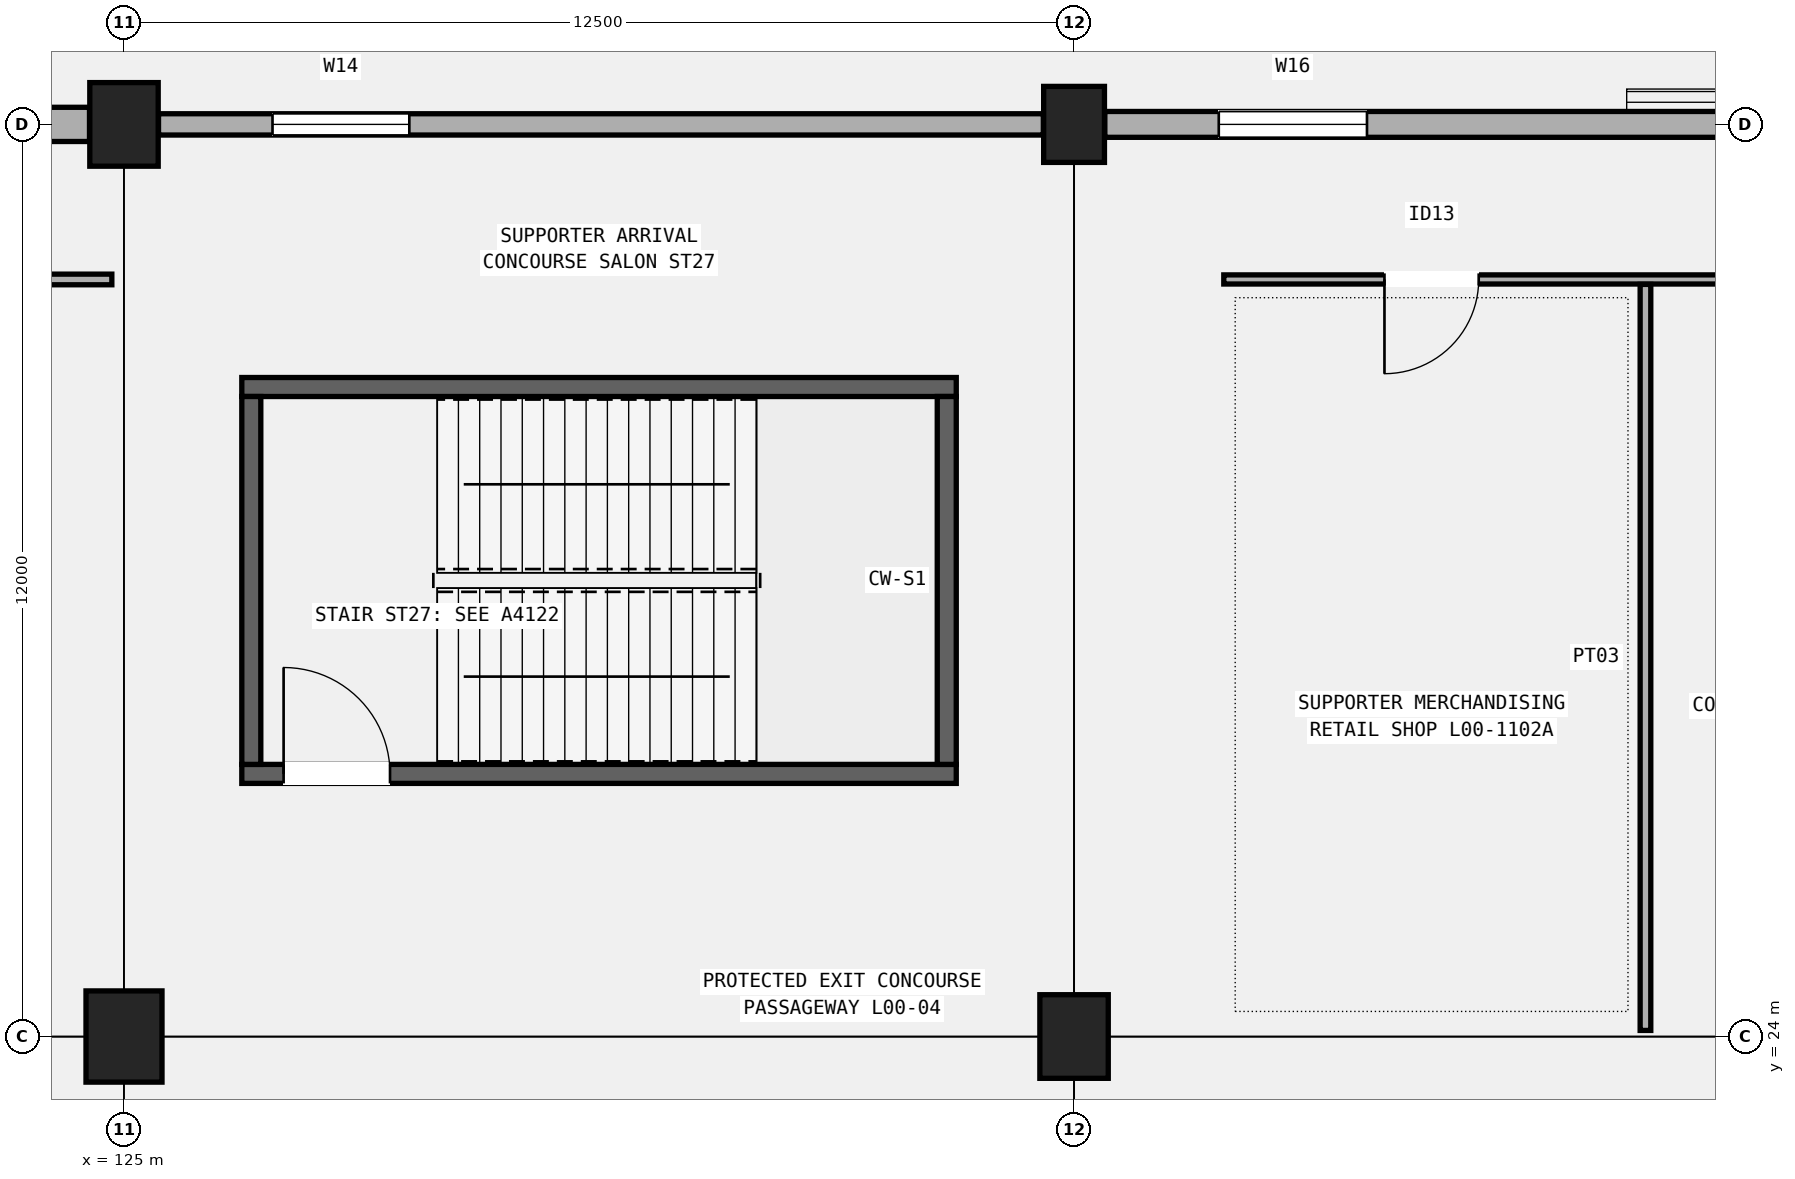
"""IFC4 building model, lengths in metres.
Left out: names, types, materials, properties, quantities, classifications, styles, units other than length and angle.
Written with IfcOpenShell. Run it as: python <this file> out.ifc"""

import sys

from ifc_helpers import new_model, si_unit, direction, frame, frame_2d, origin, origin_2d, place, context, subcontext, project, spatial, rectangle, extrude, element, fill, save


model = new_model("IFC4")
c1 = context("Model", 3, precision=1e-05, world=origin(), true_north=direction((0.0, 1.0)))
c2 = subcontext(c1, "Body", "Model", "MODEL_VIEW")
j1 = project(units=[si_unit("LENGTHUNIT", "METRE"), si_unit("PLANEANGLEUNIT", "RADIAN")], contexts=[c1])
p1 = place(None, origin())
s1 = spatial("IfcSite", under=j1, at=p1, CompositionType="ELEMENT")
p2 = place(p1, origin())
s2 = spatial("IfcBuilding", under=s1, at=p2, CompositionType="ELEMENT")
p3 = place(p2, origin())
s3 = spatial("IfcBuildingStorey", under=s2, at=p3, CompositionType="ELEMENT", Elevation=0.0)
p4 = place(p3, frame((125.0, 24.0, 0.0), z_axis=(0.0, 0.0, 1.0), x_axis=(1.0, 0.0, 0.0)))
e1 = element("IfcColumn", 1, at=p4, inside=s3, PredefinedType="COLUMN", context=c2, shape_type="SweptSolid", body=[
    extrude(rectangle(XDim=1.0, YDim=1.2, at=origin_2d()), origin(), (0.0, 0.0, 1.0), 5.4),
])
for number, where, z_axis, x_axis in (
    (2, (125.0, 36.0, 0.0), (0.0, 0.0, 1.0), (1.0, 0.0, 0.0)),
    (3, (137.5, 24.0, 0.0), (0.0, 0.0, 1.0), (1.0, 0.0, 0.0)),
):
    element("IfcColumn", number, at=place(p3, frame(where, z_axis=z_axis, x_axis=x_axis)), inside=s3, PredefinedType="COLUMN", context=c2, shape_type="SweptSolid", body=[
        extrude(rectangle(XDim=0.9, YDim=1.1, at=origin_2d()), origin(), (0.0, 0.0, 1.0), 5.4),
    ])
p5 = place(p3, frame((137.5, 36.0, 0.0), z_axis=(0.0, 0.0, 1.0), x_axis=(1.0, 0.0, 0.0)))
e4 = element("IfcColumn", 4, at=p5, inside=s3, PredefinedType="COLUMN", context=c2, shape_type="SweptSolid", body=[
    extrude(rectangle(XDim=0.8, YDim=1.0, at=origin_2d()), origin(), (0.0, 0.0, 1.0), 5.4),
])
p6 = place(p3, frame((112.504, 36.0, 0.0), z_axis=(0.0, 0.0, 1.0), x_axis=(1.0, 0.0, 0.0)))
e5 = element("IfcWall", 5, at=p6, inside=s3, PredefinedType="SOLIDWALL", context=c2, shape_type="SweptSolid", body=[
    extrude(rectangle(XDim=12.042, YDim=0.45, at=frame_2d((6.021, 0.0))), origin(), (0.0, 0.0, 1.0), 4.09),
])
p7 = place(p6, frame((1.5, 0.0, 0.95)))
e6 = element("IfcOpeningElement", 6, at=p7, cuts=e5, PredefinedType="OPENING", context=c2, shape_type="SweptSolid", body=[
    extrude(rectangle(XDim=1.65, YDim=2.45, at=frame_2d((0.825, 1.225))), frame((0.0, 0.235, 0.0), z_axis=(0.0, -1.0, 0.0), x_axis=(1.0, 0.0, 0.0)), (0.0, 0.0, 1.0), 0.47),
])
p8 = place(p3, frame((125.454, 36.0, 0.0), z_axis=(0.0, 0.0, 1.0), x_axis=(1.0, 0.0, 0.0)))
e7 = element("IfcWall", 7, at=p8, inside=s3, PredefinedType="SOLIDWALL", context=c2, shape_type="SweptSolid", body=[
    extrude(rectangle(XDim=11.642, YDim=0.28, at=frame_2d((5.821, 0.0))), origin(), (0.0, 0.0, 1.0), 4.24),
])
p9 = place(p8, frame((1.5, 0.0, 0.95)))
e8 = element("IfcOpeningElement", 8, at=p9, cuts=e7, PredefinedType="OPENING", context=c2, shape_type="SweptSolid", body=[
    extrude(rectangle(XDim=1.8, YDim=2.15, at=frame_2d((0.9, 1.075))), frame((0.0, 0.15, 0.0), z_axis=(0.0, -1.0, 0.0), x_axis=(1.0, 0.0, 0.0)), (0.0, 0.0, 1.0), 0.3),
])
p10 = place(p3, frame((137.904, 36.0, 0.0), z_axis=(0.0, 0.0, 1.0), x_axis=(1.0, 0.0, 0.0)))
e9 = element("IfcWall", 9, at=p10, inside=s3, PredefinedType="SOLIDWALL", context=c2, shape_type="SweptSolid", body=[
    extrude(rectangle(XDim=11.667, YDim=0.34, at=frame_2d((5.833, 0.0))), origin(), (0.0, 0.0, 1.0), 4.24),
])
p11 = place(p10, frame((1.5, 0.0, 0.95)))
e10 = element("IfcOpeningElement", 10, at=p11, cuts=e9, PredefinedType="OPENING", context=c2, shape_type="SweptSolid", body=[
    extrude(rectangle(XDim=1.95, YDim=1.9, at=frame_2d((0.975, 0.95))), frame((0.0, 0.18, 0.0), z_axis=(0.0, -1.0, 0.0), x_axis=(1.0, 0.0, 0.0)), (0.0, 0.0, 1.0), 0.36),
])
p12 = place(p3, frame((126.55, 27.455, 0.0), z_axis=(0.0, 0.0, 1.0), x_axis=(1.0, 0.0, 0.0)))
e11 = element("IfcWall", 11, at=p12, inside=s3, PredefinedType="SHEAR", context=c2, shape_type="SweptSolid", body=[
    extrude(rectangle(XDim=9.4, YDim=0.25, at=frame_2d((4.7, 0.0))), origin(), (0.0, 0.0, 1.0), 5.14),
])
p13 = place(p12, frame((0.55, 0.0, 0.0)))
e12 = element("IfcOpeningElement", 12, at=p13, cuts=e11, PredefinedType="OPENING", context=c2, shape_type="SweptSolid", body=[
    extrude(rectangle(XDim=1.4, YDim=2.15, at=frame_2d((0.7, 1.075))), frame((0.0, 0.135, 0.0), z_axis=(0.0, -1.0, 0.0), x_axis=(1.0, 0.0, 0.0)), (0.0, 0.0, 1.0), 0.27),
])
p14 = place(p3, frame((126.55, 32.545, 0.0), z_axis=(0.0, 0.0, 1.0), x_axis=(1.0, 0.0, 0.0)))
e13 = element("IfcWall", 13, at=p14, inside=s3, PredefinedType="SHEAR", context=c2, shape_type="SweptSolid", body=[
    extrude(rectangle(XDim=9.4, YDim=0.25, at=frame_2d((4.7, 0.0))), origin(), (0.0, 0.0, 1.0), 5.14),
])
for number, where, z_axis, x_axis in (
    (14, (126.675, 27.58, 0.0), (0.0, 0.0, 1.0), (0.0, 1.0, 0.0)),
    (15, (135.825, 27.58, 0.0), (0.0, 0.0, 1.0), (0.0, 1.0, 0.0)),
):
    element("IfcWall", number, at=place(p3, frame(where, z_axis=z_axis, x_axis=x_axis)), inside=s3, PredefinedType="SHEAR", context=c2, shape_type="SweptSolid", body=[
        extrude(rectangle(XDim=4.84, YDim=0.25, at=frame_2d((2.42, 0.0))), origin(), (0.0, 0.0, 1.0), 5.14),
    ])
p15 = place(p3, frame((112.16, 33.96, 0.0), z_axis=(0.0, 0.0, 1.0), x_axis=(1.0, 0.0, 0.0)))
e16 = element("IfcWall", 16, at=p15, inside=s3, PredefinedType="PARTITIONING", context=c2, shape_type="SweptSolid", body=[
    extrude(rectangle(XDim=12.68, YDim=0.14, at=frame_2d((6.34, 0.0))), origin(), (0.0, 0.0, 1.0), 4.52),
])
p16 = place(p15, frame((6.83, 0.0, 0.0), z_axis=(0.0, 0.0, 1.0), x_axis=(-1.0, 0.0, 0.0)))
e17 = element("IfcOpeningElement", 17, at=p16, cuts=e16, PredefinedType="OPENING", context=c2, shape_type="SweptSolid", body=[
    extrude(rectangle(XDim=0.98, YDim=2.1, at=frame_2d((0.49, 1.05))), frame((0.0, 0.08, 0.0), z_axis=(0.0, -1.0, 0.0), x_axis=(1.0, 0.0, 0.0)), (0.0, 0.0, 1.0), 0.16),
])
p17 = place(p3, frame((139.47, 33.96, 0.0), z_axis=(0.0, 0.0, 1.0), x_axis=(1.0, 0.0, 0.0)))
e18 = element("IfcWall", 18, at=p17, inside=s3, PredefinedType="PARTITIONING", context=c2, shape_type="SweptSolid", body=[
    extrude(rectangle(XDim=10.37, YDim=0.12, at=frame_2d((5.185, 0.0))), origin(), (0.0, 0.0, 1.0), 4.52),
])
p18 = place(p17, frame((3.354, 0.0, 0.0), z_axis=(0.0, 0.0, 1.0), x_axis=(-1.0, 0.0, 0.0)))
e19 = element("IfcOpeningElement", 19, at=p18, cuts=e18, PredefinedType="OPENING", context=c2, shape_type="SweptSolid", body=[
    extrude(rectangle(XDim=1.24, YDim=2.22, at=frame_2d((0.62, 1.11))), frame((0.0, 0.07, 0.0), z_axis=(0.0, -1.0, 0.0), x_axis=(1.0, 0.0, 0.0)), (0.0, 0.0, 1.0), 0.14),
])
p19 = place(p17, frame((8.634, 0.0, 0.0), z_axis=(0.0, 0.0, 1.0), x_axis=(-1.0, 0.0, 0.0)))
e20 = element("IfcOpeningElement", 20, at=p19, cuts=e18, PredefinedType="OPENING", context=c2, shape_type="SweptSolid", body=[
    extrude(rectangle(XDim=1.27, YDim=2.2, at=frame_2d((0.635, 1.1))), frame((0.0, 0.07, 0.0), z_axis=(0.0, -1.0, 0.0), x_axis=(1.0, 0.0, 0.0)), (0.0, 0.0, 1.0), 0.14),
])
p20 = place(p3, frame((145.018, 24.08, 0.0), z_axis=(0.0, 0.0, 1.0), x_axis=(0.0, 1.0, 0.0)))
e21 = element("IfcWall", 21, at=p20, inside=s3, PredefinedType="PARTITIONING", context=c2, shape_type="SweptSolid", body=[
    extrude(rectangle(XDim=9.815, YDim=0.14, at=frame_2d((4.907, 0.0))), origin(), (0.0, 0.0, 1.0), 4.52),
])
p21 = place(p9, origin())
e22 = element("IfcWindow", 22, at=p21, inside=s3, PartitioningType="SINGLE_PANEL", PredefinedType="WINDOW", context=c2, shape_type="SweptSolid", body=[
    extrude(rectangle(XDim=1.8, YDim=2.15, at=frame_2d((0.9, 1.075))), frame((0.0, 0.03, 0.0), z_axis=(0.0, -1.0, 0.0), x_axis=(1.0, 0.0, 0.0)), (0.0, 0.0, 1.0), 0.06),
])
fill(e8, e22)
p22 = place(p11, origin())
e23 = element("IfcWindow", 23, at=p22, inside=s3, PartitioningType="SINGLE_PANEL", PredefinedType="WINDOW", context=c2, shape_type="SweptSolid", body=[
    extrude(rectangle(XDim=1.95, YDim=1.9, at=frame_2d((0.975, 0.95))), frame((0.0, 0.03, 0.0), z_axis=(0.0, -1.0, 0.0), x_axis=(1.0, 0.0, 0.0)), (0.0, 0.0, 1.0), 0.06),
])
fill(e10, e23)
p23 = place(p13, origin())
e24 = element("IfcDoor", 24, at=p23, inside=s3, OperationType="SINGLE_SWING_LEFT", PredefinedType="DOOR", context=c2, shape_type="SweptSolid", body=[
    extrude(rectangle(XDim=1.4, YDim=2.15, at=frame_2d((0.7, 1.075))), frame((0.0, 0.025, 0.0), z_axis=(0.0, -1.0, 0.0), x_axis=(1.0, 0.0, 0.0)), (0.0, 0.0, 1.0), 0.05),
])
fill(e12, e24)
p24 = place(p18, origin())
e25 = element("IfcDoor", 25, at=p24, inside=s3, OperationType="SINGLE_SWING_RIGHT", PredefinedType="DOOR", context=c2, shape_type="SweptSolid", body=[
    extrude(rectangle(XDim=1.24, YDim=2.22, at=frame_2d((0.62, 1.11))), frame((0.0, 0.025, 0.0), z_axis=(0.0, -1.0, 0.0), x_axis=(1.0, 0.0, 0.0)), (0.0, 0.0, 1.0), 0.05),
])
fill(e19, e25)
save(model, sys.argv[1])
